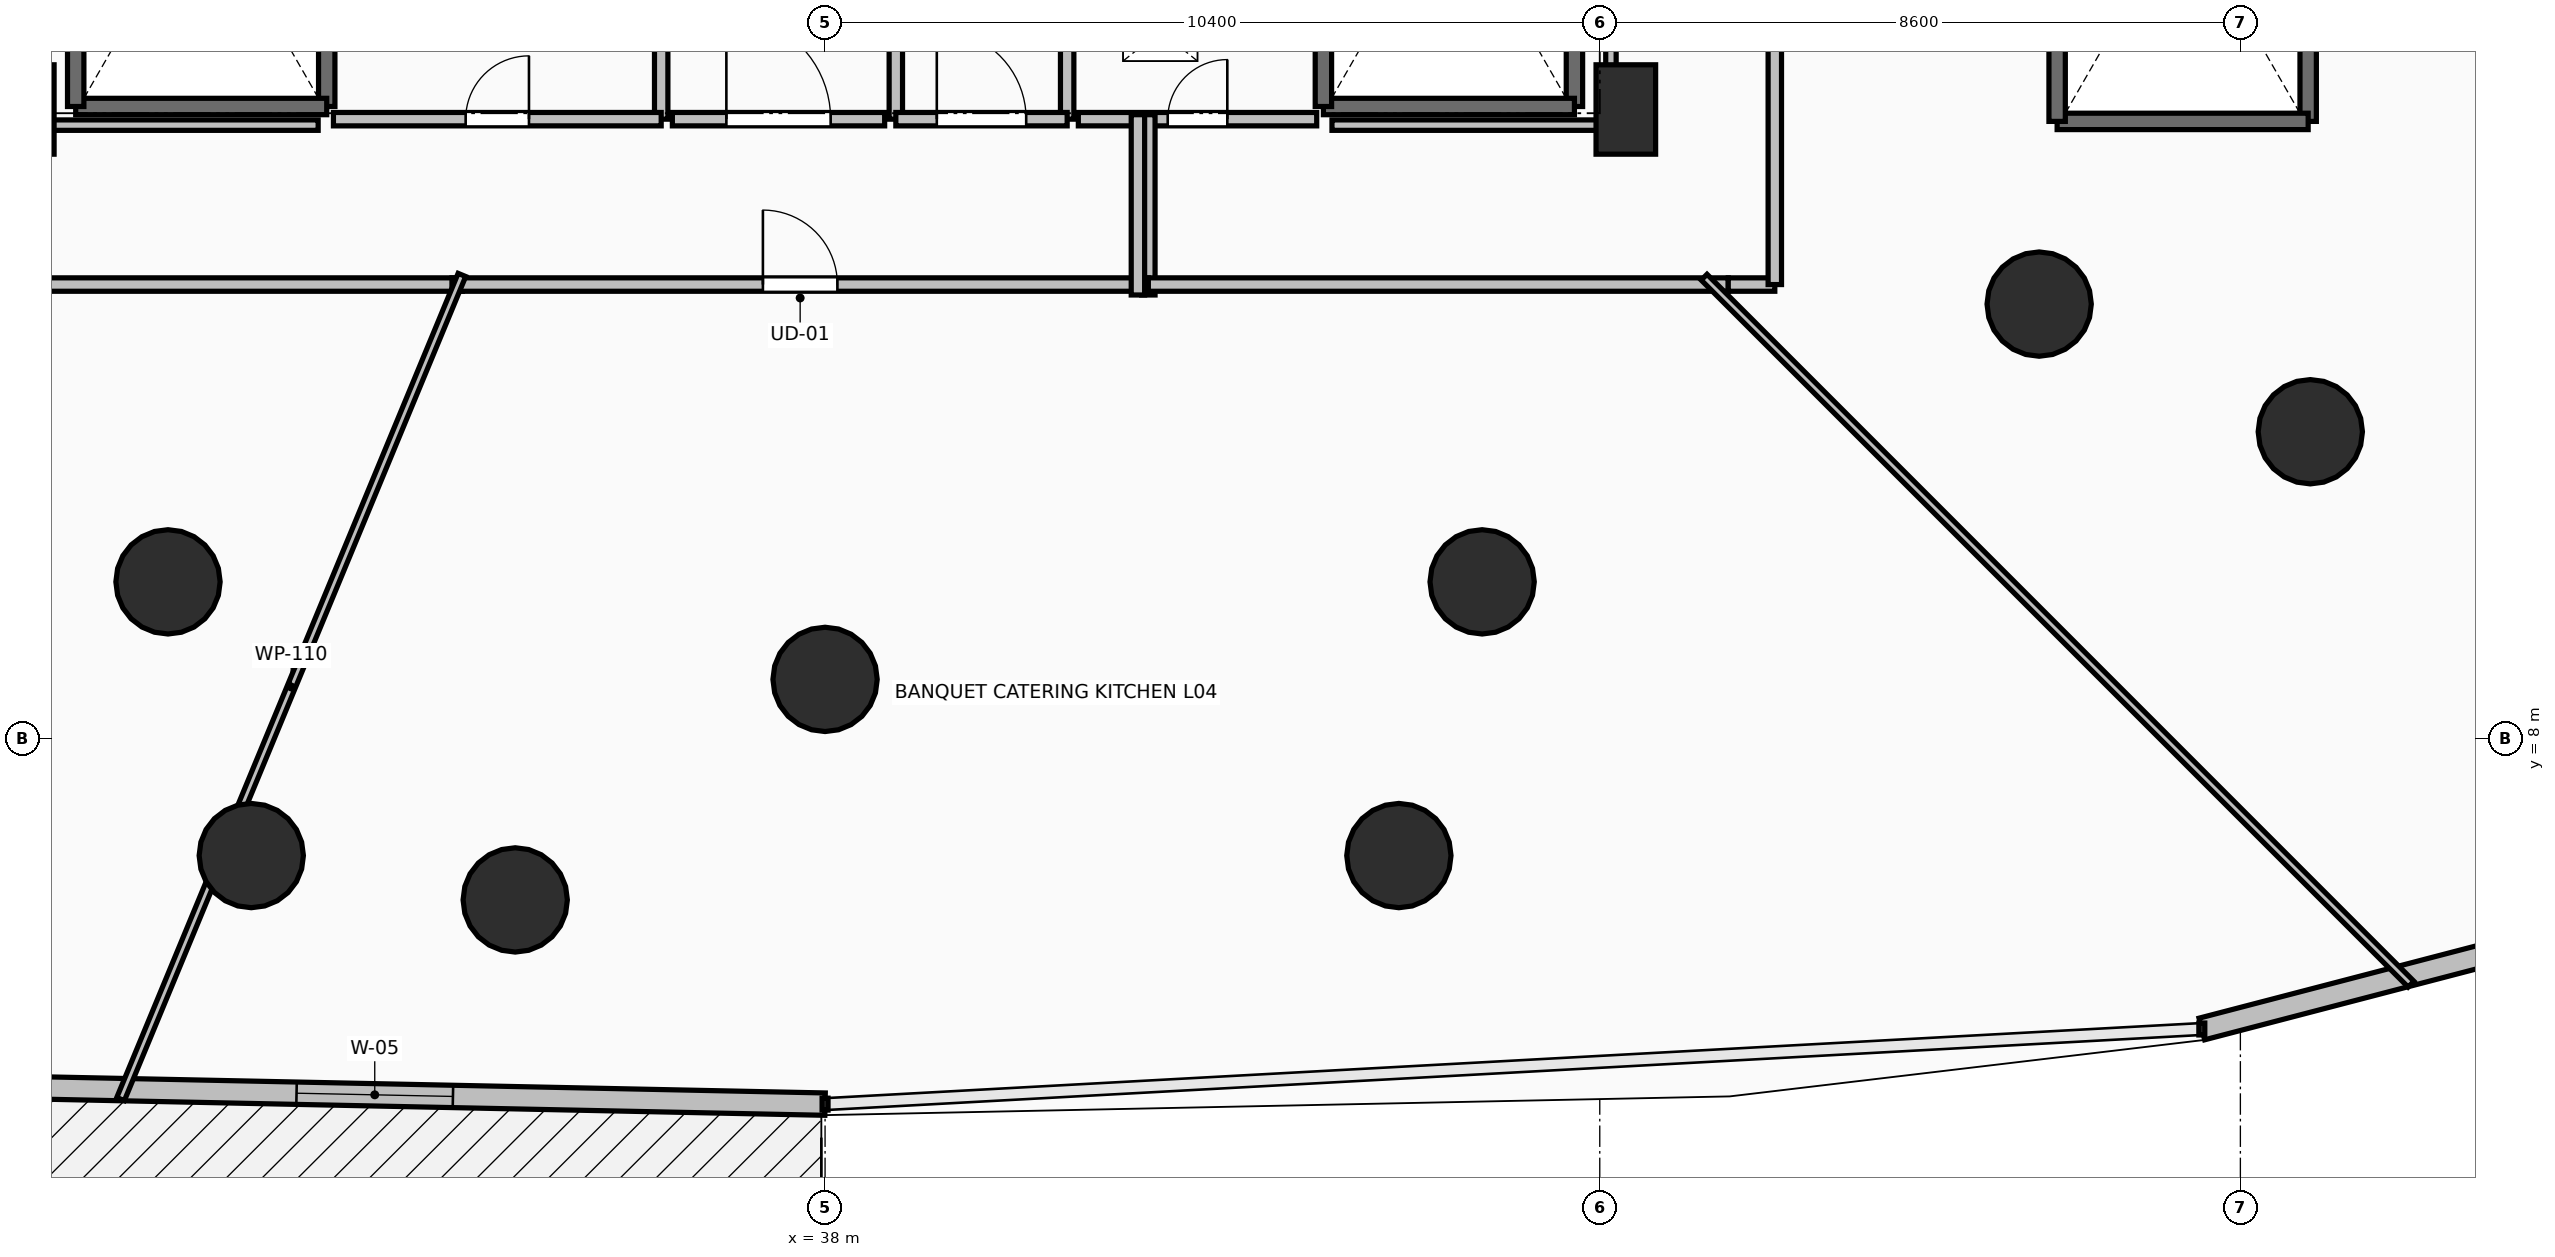
"""IFC4 building model, lengths in metres.
Left out: names, types, materials, properties, quantities, classifications, styles, units other than length and angle.
Written with IfcOpenShell. Run it as: python <this file> out.ifc"""

import sys

from ifc_helpers import new_model, si_unit, direction, frame, frame_2d, origin, origin_2d, place, context, subcontext, project, spatial, rectangle, circle, extrude, element, fill, save


model = new_model("IFC4")
c1 = context("Model", 3, precision=1e-05, world=origin(), true_north=direction((0.0, 1.0)))
c2 = subcontext(c1, "Body", "Model", "MODEL_VIEW")
j1 = project(units=[si_unit("LENGTHUNIT", "METRE"), si_unit("PLANEANGLEUNIT", "RADIAN")], contexts=[c1])
p1 = place(None, origin())
s1 = spatial("IfcSite", under=j1, at=p1, CompositionType="ELEMENT")
p2 = place(p1, origin())
s2 = spatial("IfcBuilding", under=s1, at=p2, CompositionType="ELEMENT")
p3 = place(p2, frame((0.0, 0.0, 19.2)))
s3 = spatial("IfcBuildingStorey", under=s2, at=p3, CompositionType="ELEMENT", Elevation=19.2)
for number, where, z_axis, x_axis in (
    (1, (29.179, 10.109, 0.0), (0.0, 0.0, 1.0), (-0.383, -0.924, 0.0)),
    (2, (38.0, 8.8, 0.0), (0.0, 0.0, 1.0), (0.0, -1.0, 0.0)),
    (3, (46.821, 10.109, 0.0), (0.0, 0.0, 1.0), (0.383, -0.924, 0.0)),
    (4, (54.299, 13.838, 0.0), (0.0, 0.0, 1.0), (0.707, -0.707, 0.0)),
    (5, (30.297, 6.435, 0.0), (0.0, 0.0, 1.0), (-0.383, -0.924, 0.0)),
    (6, (33.84, 5.84, 0.0), (0.0, 0.0, 1.0), (0.0, -1.0, 0.0)),
    (7, (45.703, 6.435, 0.0), (0.0, 0.0, 1.0), (0.383, -0.924, 0.0)),
    (8, (57.939, 12.124, 0.0), (0.0, 0.0, 1.0), (0.707, -0.707, 0.0)),
):
    element("IfcColumn", number, at=place(p3, frame(where, z_axis=z_axis, x_axis=x_axis)), inside=s3, PredefinedType="COLUMN", context=c2, shape_type="SweptSolid", body=[
        extrude(circle(Radius=0.7, at=origin_2d()), origin(), (0.0, 0.0, 1.0), 4.8),
    ])
for number, where, z_axis, x_axis in (
    (9, (27.25, 16.45, 0.0), (0.0, 0.0, 1.0), (1.0, 0.0, 0.0)),
    (10, (48.75, 16.45, 0.0), (0.0, 0.0, 1.0), (1.0, 0.0, 0.0)),
):
    element("IfcColumn", number, at=place(p3, frame(where, z_axis=z_axis, x_axis=x_axis)), inside=s3, PredefinedType="PILASTER", context=c2, shape_type="SweptSolid", body=[
        extrude(rectangle(XDim=0.8, YDim=1.2, at=origin_2d()), origin(), (0.0, 0.0, 1.0), 4.8),
    ])
p4 = place(p3, frame((25.909, 3.348, 0.0), z_axis=(0.0, 0.0, 1.0), x_axis=(0.99978671963, -0.020652245662, 0.0)))
e11 = element("IfcWall", 11, at=p4, inside=s3, PredefinedType="STANDARD", context=c2, shape_type="SweptSolid", body=[
    extrude(rectangle(XDim=12.094, YDim=0.3, at=frame_2d((6.047, 0.0))), origin(), (0.0, 0.0, 1.0), 4.54),
])
p5 = place(p4, frame((4.997, 0.0, 0.85)))
e12 = element("IfcOpeningElement", 12, at=p5, cuts=e11, PredefinedType="OPENING", context=c2, shape_type="SweptSolid", body=[
    extrude(rectangle(XDim=2.1, YDim=2.8, at=frame_2d((1.05, 1.4))), frame((0.0, 0.165, 0.0), z_axis=(0.0, -1.0, 0.0), x_axis=(1.0, 0.0, 0.0)), (0.0, 0.0, 1.0), 0.33),
])
p6 = place(p3, frame((56.482, 4.107, 0.0), z_axis=(0.0, 0.0, 1.0), x_axis=(0.967631926566, 0.252365716155, 0.0)))
e13 = element("IfcWall", 13, at=p6, inside=s3, PredefinedType="STANDARD", context=c2, shape_type="SweptSolid", body=[
    extrude(rectangle(XDim=5.13, YDim=0.3, at=frame_2d((2.565, 0.0))), origin(), (0.0, 0.0, 1.0), 4.54),
])
p7 = place(p3, frame((31.31, 23.91, 0.0), z_axis=(0.0, 0.0, 1.0), x_axis=(0.0, -1.0, 0.0)))
e14 = element("IfcWall", 14, at=p7, inside=s3, PredefinedType="SOLIDWALL", context=c2, shape_type="SweptSolid", body=[
    extrude(rectangle(XDim=7.42, YDim=0.22, at=frame_2d((3.71, 0.0))), origin(), (0.0, 0.0, 1.0), 4.54),
])
p8 = place(p3, frame((31.31, 16.49, 0.0), z_axis=(0.0, 0.0, 1.0), x_axis=(-1.0, 0.0, 0.0)))
e15 = element("IfcWall", 15, at=p8, inside=s3, PredefinedType="SOLIDWALL", context=c2, shape_type="SweptSolid", body=[
    extrude(rectangle(XDim=3.37, YDim=0.22, at=frame_2d((1.685, 0.0))), origin(), (0.0, 0.0, 1.0), 4.54),
])
for number, where, z_axis, x_axis in (
    (16, (27.94, 16.49, 0.0), (0.0, 0.0, 1.0), (0.0, 1.0, 0.0)),
    (17, (48.06, 23.91, 0.0), (0.0, 0.0, 1.0), (0.0, -1.0, 0.0)),
):
    element("IfcWall", number, at=place(p3, frame(where, z_axis=z_axis, x_axis=x_axis)), inside=s3, PredefinedType="SOLIDWALL", context=c2, shape_type="SweptSolid", body=[
        extrude(rectangle(XDim=7.42, YDim=0.22, at=frame_2d((3.71, 0.0))), origin(), (0.0, 0.0, 1.0), 4.54),
    ])
p9 = place(p3, frame((48.06, 16.49, 0.0), z_axis=(0.0, 0.0, 1.0), x_axis=(-1.0, 0.0, 0.0)))
e18 = element("IfcWall", 18, at=p9, inside=s3, PredefinedType="SOLIDWALL", context=c2, shape_type="SweptSolid", body=[
    extrude(rectangle(XDim=3.37, YDim=0.22, at=frame_2d((1.685, 0.0))), origin(), (0.0, 0.0, 1.0), 4.54),
])
for number, where, z_axis, x_axis in (
    (19, (44.69, 16.49, 0.0), (0.0, 0.0, 1.0), (0.0, 1.0, 0.0)),
    (20, (57.91, 23.71, 0.0), (0.0, 0.0, 1.0), (0.0, -1.0, 0.0)),
):
    element("IfcWall", number, at=place(p3, frame(where, z_axis=z_axis, x_axis=x_axis)), inside=s3, PredefinedType="SOLIDWALL", context=c2, shape_type="SweptSolid", body=[
        extrude(rectangle(XDim=7.42, YDim=0.22, at=frame_2d((3.71, 0.0))), origin(), (0.0, 0.0, 1.0), 4.54),
    ])
p10 = place(p3, frame((57.91, 16.29, 0.0), z_axis=(0.0, 0.0, 1.0), x_axis=(-1.0, 0.0, 0.0)))
e21 = element("IfcWall", 21, at=p10, inside=s3, PredefinedType="SOLIDWALL", context=c2, shape_type="SweptSolid", body=[
    extrude(rectangle(XDim=3.37, YDim=0.22, at=frame_2d((1.685, 0.0))), origin(), (0.0, 0.0, 1.0), 4.54),
])
p11 = place(p3, frame((54.54, 16.29, 0.0), z_axis=(0.0, 0.0, 1.0), x_axis=(0.0, 1.0, 0.0)))
e22 = element("IfcWall", 22, at=p11, inside=s3, PredefinedType="SOLIDWALL", context=c2, shape_type="SweptSolid", body=[
    extrude(rectangle(XDim=7.42, YDim=0.22, at=frame_2d((3.71, 0.0))), origin(), (0.0, 0.0, 1.0), 4.54),
])
p12 = place(p3, frame((41.25, 16.32, 0.0), z_axis=(0.0, 0.0, 1.0), x_axis=(0.0, 1.0, 0.0)))
e23 = element("IfcWall", 23, at=p12, inside=s3, PredefinedType="PARTITIONING", context=c2, shape_type="SweptSolid", body=[
    extrude(rectangle(XDim=3.985, YDim=0.18, at=frame_2d((1.992, 0.0))), origin(), (0.0, 0.0, 1.0), 4.54),
])
p13 = place(p12, frame((1.593, 0.0, 0.0)))
e24 = element("IfcOpeningElement", 24, at=p13, cuts=e23, PredefinedType="OPENING", context=c2, shape_type="SweptSolid", body=[
    extrude(rectangle(XDim=0.8, YDim=2.05, at=frame_2d((0.4, 1.025))), frame((0.0, 0.105, 0.0), z_axis=(0.0, -1.0, 0.0), x_axis=(1.0, 0.0, 0.0)), (0.0, 0.0, 1.0), 0.21),
])
p14 = place(p3, frame((38.95, 21.755, 0.0), z_axis=(0.0, 0.0, 1.0), x_axis=(0.0, -1.0, 0.0)))
e25 = element("IfcWall", 25, at=p14, inside=s3, PredefinedType="PARTITIONING", context=c2, shape_type="SweptSolid", body=[
    extrude(rectangle(XDim=5.435, YDim=0.18, at=frame_2d((2.717, 0.0))), origin(), (0.0, 0.0, 1.0), 4.54),
])
p15 = place(p14, frame((2.018, 0.0, 0.0)))
e26 = element("IfcOpeningElement", 26, at=p15, cuts=e25, PredefinedType="OPENING", context=c2, shape_type="SweptSolid", body=[
    extrude(rectangle(XDim=1.4, YDim=2.2, at=frame_2d((0.7, 1.1))), frame((0.0, 0.105, 0.0), z_axis=(0.0, -1.0, 0.0), x_axis=(1.0, 0.0, 0.0)), (0.0, 0.0, 1.0), 0.21),
])
p16 = place(p3, frame((38.95, 16.32, 0.0), z_axis=(0.0, 0.0, 1.0), x_axis=(1.0, 0.0, 0.0)))
e27 = element("IfcWall", 27, at=p16, inside=s3, PredefinedType="PARTITIONING", context=c2, shape_type="SweptSolid", body=[
    extrude(rectangle(XDim=2.3, YDim=0.18, at=frame_2d((1.15, 0.0))), origin(), (0.0, 0.0, 1.0), 4.54),
])
p17 = place(p16, frame((0.55, 0.0, 0.0)))
e28 = element("IfcOpeningElement", 28, at=p17, cuts=e27, PredefinedType="OPENING", context=c2, shape_type="SweptSolid", body=[
    extrude(rectangle(XDim=1.2, YDim=2.15, at=frame_2d((0.6, 1.075))), frame((0.0, 0.105, 0.0), z_axis=(0.0, -1.0, 0.0), x_axis=(1.0, 0.0, 0.0)), (0.0, 0.0, 1.0), 0.21),
])
p18 = place(p3, frame((41.4, 16.32, 0.0), z_axis=(0.0, 0.0, 1.0), x_axis=(1.0, 0.0, 0.0)))
e29 = element("IfcWall", 29, at=p18, inside=s3, PredefinedType="PARTITIONING", context=c2, shape_type="SweptSolid", body=[
    extrude(rectangle(XDim=3.2, YDim=0.18, at=frame_2d((1.6, 0.0))), origin(), (0.0, 0.0, 1.0), 4.54),
])
p19 = place(p18, frame((1.2, 0.0, 0.0)))
e30 = element("IfcOpeningElement", 30, at=p19, cuts=e29, PredefinedType="OPENING", context=c2, shape_type="SweptSolid", body=[
    extrude(rectangle(XDim=0.8, YDim=2.05, at=frame_2d((0.4, 1.025))), frame((0.0, 0.105, 0.0), z_axis=(0.0, -1.0, 0.0), x_axis=(1.0, 0.0, 0.0)), (0.0, 0.0, 1.0), 0.21),
])
p20 = place(p3, frame((35.8, 16.32, 0.0), z_axis=(0.0, 0.0, 1.0), x_axis=(0.0, 1.0, 0.0)))
e31 = element("IfcWall", 31, at=p20, inside=s3, PredefinedType="PARTITIONING", context=c2, shape_type="SweptSolid", body=[
    extrude(rectangle(XDim=5.13, YDim=0.18, at=frame_2d((2.565, 0.0))), origin(), (0.0, 0.0, 1.0), 4.54),
])
p21 = place(p3, frame((31.4, 16.32, 0.0), z_axis=(0.0, 0.0, 1.0), x_axis=(1.0, 0.0, 0.0)))
e32 = element("IfcWall", 32, at=p21, inside=s3, PredefinedType="PARTITIONING", context=c2, shape_type="SweptSolid", body=[
    extrude(rectangle(XDim=4.4, YDim=0.18, at=frame_2d((2.2, 0.0))), origin(), (0.0, 0.0, 1.0), 4.54),
])
p22 = place(p21, frame((1.775, 0.0, 0.0)))
e33 = element("IfcOpeningElement", 33, at=p22, cuts=e32, PredefinedType="OPENING", context=c2, shape_type="SweptSolid", body=[
    extrude(rectangle(XDim=0.85, YDim=2.1, at=frame_2d((0.425, 1.05))), frame((0.0, 0.105, 0.0), z_axis=(0.0, -1.0, 0.0), x_axis=(1.0, 0.0, 0.0)), (0.0, 0.0, 1.0), 0.21),
])
p23 = place(p3, frame((35.95, 16.32, 0.0), z_axis=(0.0, 0.0, 1.0), x_axis=(1.0, 0.0, 0.0)))
e34 = element("IfcWall", 34, at=p23, inside=s3, PredefinedType="PARTITIONING", context=c2, shape_type="SweptSolid", body=[
    extrude(rectangle(XDim=2.85, YDim=0.18, at=frame_2d((1.425, 0.0))), origin(), (0.0, 0.0, 1.0), 4.54),
])
p24 = place(p23, frame((0.725, 0.0, 0.0)))
e35 = element("IfcOpeningElement", 35, at=p24, cuts=e34, PredefinedType="OPENING", context=c2, shape_type="SweptSolid", body=[
    extrude(rectangle(XDim=1.4, YDim=2.2, at=frame_2d((0.7, 1.1))), frame((0.0, 0.105, 0.0), z_axis=(0.0, -1.0, 0.0), x_axis=(1.0, 0.0, 0.0)), (0.0, 0.0, 1.0), 0.21),
])
p25 = place(p3, frame((25.25, 14.1, 0.0), z_axis=(0.0, 0.0, 1.0), x_axis=(1.0, 0.0, 0.0)))
e36 = element("IfcWall", 36, at=p25, inside=s3, PredefinedType="PARTITIONING", context=c2, shape_type="SweptSolid", body=[
    extrude(rectangle(XDim=7.881, YDim=0.18, at=frame_2d((3.94, 0.0))), origin(), (0.0, 0.0, 1.0), 3.732),
])
p26 = place(p3, frame((42.34, 16.38, 0.0), z_axis=(0.0, 0.0, 1.0), x_axis=(0.0, -1.0, 0.0)))
e37 = element("IfcWall", 37, at=p26, inside=s3, PredefinedType="PARTITIONING", context=c2, shape_type="SweptSolid", body=[
    extrude(rectangle(XDim=2.42, YDim=0.18, at=frame_2d((1.21, 0.0))), origin(), (0.0, 0.0, 1.0), 4.54),
])
p27 = place(p3, frame((42.2, 14.1, 0.0), z_axis=(0.0, 0.0, 1.0), x_axis=(1.0, 0.0, 0.0)))
e38 = element("IfcWall", 38, at=p27, inside=s3, PredefinedType="PARTITIONING", context=c2, shape_type="SweptSolid", body=[
    extrude(rectangle(XDim=7.925, YDim=0.18, at=frame_2d((3.962, 0.0))), origin(), (0.0, 0.0, 1.0), 3.732),
])
p28 = place(p3, frame((32.991, 14.1, 0.0), z_axis=(0.0, 0.0, 1.0), x_axis=(1.0, 0.0, 0.0)))
e39 = element("IfcWall", 39, at=p28, inside=s3, PredefinedType="PARTITIONING", context=c2, shape_type="SweptSolid", body=[
    extrude(rectangle(XDim=9.349, YDim=0.18, at=frame_2d((4.675, 0.0))), origin(), (0.0, 0.0, 1.0), 4.54),
])
p29 = place(p28, frame((4.175, 0.0, 0.0)))
e40 = element("IfcOpeningElement", 40, at=p29, cuts=e39, PredefinedType="OPENING", context=c2, shape_type="SweptSolid", body=[
    extrude(rectangle(XDim=1.0, YDim=2.15, at=frame_2d((0.5, 1.075))), frame((0.0, 0.105, 0.0), z_axis=(0.0, -1.0, 0.0), x_axis=(1.0, 0.0, 0.0)), (0.0, 0.0, 1.0), 0.21),
])
p30 = place(p3, frame((42.2, 13.96, 0.0), z_axis=(0.0, 0.0, 1.0), x_axis=(0.0, 1.0, 0.0)))
e41 = element("IfcWall", 41, at=p30, inside=s3, PredefinedType="PARTITIONING", context=c2, shape_type="SweptSolid", body=[
    extrude(rectangle(XDim=2.42, YDim=0.18, at=frame_2d((1.21, 0.0))), origin(), (0.0, 0.0, 1.0), 4.54),
])
p31 = place(p3, frame((50.125, 14.1, 0.0), z_axis=(0.0, 0.0, 1.0), x_axis=(1.0, 0.0, 0.0)))
e42 = element("IfcWall", 42, at=p31, inside=s3, PredefinedType="PARTITIONING", context=c2, shape_type="SweptSolid", body=[
    extrude(rectangle(XDim=0.625, YDim=0.18, at=frame_2d((0.312, 0.0))), origin(), (0.0, 0.0, 1.0), 4.222),
])
p32 = place(p3, frame((50.75, 14.1, 0.0), z_axis=(0.0, 0.0, 1.0), x_axis=(0.0, 1.0, 0.0)))
e43 = element("IfcWall", 43, at=p32, inside=s3, PredefinedType="PARTITIONING", context=c2, shape_type="SweptSolid", body=[
    extrude(rectangle(XDim=11.84, YDim=0.18, at=frame_2d((5.92, 0.0))), origin(), (0.0, 0.0, 1.0), 3.732),
])
p33 = place(p32, frame((5.42, 0.0, 0.0)))
e44 = element("IfcOpeningElement", 44, at=p33, cuts=e43, PredefinedType="OPENING", context=c2, shape_type="SweptSolid", body=[
    extrude(rectangle(XDim=1.0, YDim=2.15, at=frame_2d((0.5, 1.075))), frame((0.0, 0.105, 0.0), z_axis=(0.0, -1.0, 0.0), x_axis=(1.0, 0.0, 0.0)), (0.0, 0.0, 1.0), 0.21),
])
p34 = place(p3, frame((28.542, 3.167, 0.0), z_axis=(0.0, 0.0, 1.0), x_axis=(0.382668727465, 0.923885623343, 0.0)))
e45 = element("IfcWall", 45, at=p34, inside=s3, PredefinedType="PARTITIONING", context=c2, shape_type="SweptSolid", body=[
    extrude(rectangle(XDim=11.974, YDim=0.11, at=frame_2d((5.987, 0.0))), origin(), (0.0, 0.0, 1.0), 3.732),
])
p35 = place(p3, frame((59.291, 4.709, 0.0), z_axis=(0.0, 0.0, 1.0), x_axis=(-0.707106781187, 0.707106781187, 0.0)))
e46 = element("IfcWall", 46, at=p35, inside=s3, PredefinedType="PARTITIONING", context=c2, shape_type="SweptSolid", body=[
    extrude(rectangle(XDim=13.421, YDim=0.11, at=frame_2d((6.71, 0.0))), origin(), (0.0, 0.0, 1.0), 3.829),
])
p36 = place(p3, frame((48.55, 23.754, 0.0), z_axis=(0.0, 0.0, 1.0), x_axis=(0.0, -1.0, 0.0)))
e47 = element("IfcWall", 47, at=p36, inside=s3, PredefinedType="PARTITIONING", context=c2, shape_type="SweptSolid", body=[
    extrude(rectangle(XDim=7.514, YDim=0.14, at=frame_2d((3.757, 0.0))), origin(), (0.0, 0.0, 1.0), 3.732),
])
for number, where, z_axis, x_axis in (
    (48, (48.55, 16.24, 0.0), (0.0, 0.0, 1.0), (-1.0, 0.0, 0.0)),
    (49, (31.195, 16.24, 0.0), (0.0, 0.0, 1.0), (-1.0, 0.0, 0.0)),
):
    element("IfcWall", number, at=place(p3, frame(where, z_axis=z_axis, x_axis=x_axis)), inside=s3, PredefinedType="PARTITIONING", context=c2, shape_type="SweptSolid", body=[
        extrude(rectangle(XDim=3.745, YDim=0.14, at=frame_2d((1.873, 0.0))), origin(), (0.0, 0.0, 1.0), 3.732),
    ])
p37 = place(p5, origin())
e50 = element("IfcWindow", 50, at=p37, inside=s3, PartitioningType="SINGLE_PANEL", PredefinedType="WINDOW", context=c2, shape_type="SweptSolid", body=[
    extrude(rectangle(XDim=2.1, YDim=2.8, at=frame_2d((1.05, 1.4))), frame((0.0, 0.03, 0.0), z_axis=(0.0, -1.0, 0.0), x_axis=(1.0, 0.0, 0.0)), (0.0, 0.0, 1.0), 0.06),
])
fill(e12, e50)
p38 = place(p17, origin())
e51 = element("IfcDoor", 51, at=p38, inside=s3, OperationType="SINGLE_SWING_LEFT", PredefinedType="DOOR", context=c2, shape_type="SweptSolid", body=[
    extrude(rectangle(XDim=1.2, YDim=2.15, at=frame_2d((0.6, 1.075))), frame((0.0, 0.025, 0.0), z_axis=(0.0, -1.0, 0.0), x_axis=(1.0, 0.0, 0.0)), (0.0, 0.0, 1.0), 0.05),
])
fill(e28, e51)
p39 = place(p19, origin())
e52 = element("IfcDoor", 52, at=p39, inside=s3, OperationType="SINGLE_SWING_RIGHT", PredefinedType="DOOR", context=c2, shape_type="SweptSolid", body=[
    extrude(rectangle(XDim=0.8, YDim=2.05, at=frame_2d((0.4, 1.025))), frame((0.0, 0.025, 0.0), z_axis=(0.0, -1.0, 0.0), x_axis=(1.0, 0.0, 0.0)), (0.0, 0.0, 1.0), 0.05),
])
fill(e30, e52)
p40 = place(p22, origin())
e53 = element("IfcDoor", 53, at=p40, inside=s3, OperationType="SINGLE_SWING_RIGHT", PredefinedType="DOOR", context=c2, shape_type="SweptSolid", body=[
    extrude(rectangle(XDim=0.85, YDim=2.1, at=frame_2d((0.425, 1.05))), frame((0.0, 0.025, 0.0), z_axis=(0.0, -1.0, 0.0), x_axis=(1.0, 0.0, 0.0)), (0.0, 0.0, 1.0), 0.05),
])
fill(e33, e53)
p41 = place(p24, origin())
e54 = element("IfcDoor", 54, at=p41, inside=s3, OperationType="DOUBLE_SWING_LEFT", PredefinedType="DOOR", context=c2, shape_type="SweptSolid", body=[
    extrude(rectangle(XDim=1.4, YDim=2.2, at=frame_2d((0.7, 1.1))), frame((0.0, 0.025, 0.0), z_axis=(0.0, -1.0, 0.0), x_axis=(1.0, 0.0, 0.0)), (0.0, 0.0, 1.0), 0.05),
])
fill(e35, e54)
p42 = place(p29, origin())
e55 = element("IfcDoor", 55, at=p42, inside=s3, OperationType="SINGLE_SWING_LEFT", PredefinedType="DOOR", context=c2, shape_type="SweptSolid", body=[
    extrude(rectangle(XDim=1.0, YDim=2.15, at=frame_2d((0.5, 1.075))), frame((0.0, 0.025, 0.0), z_axis=(0.0, -1.0, 0.0), x_axis=(1.0, 0.0, 0.0)), (0.0, 0.0, 1.0), 0.05),
])
fill(e40, e55)
save(model, sys.argv[1])
